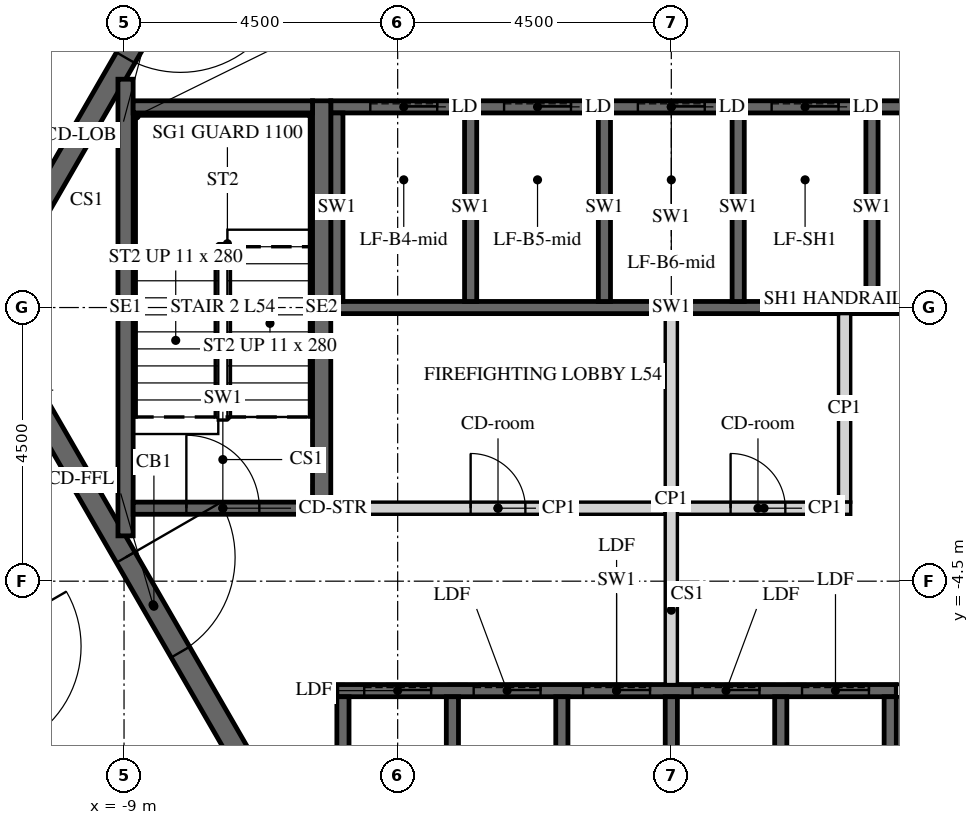
"""IFC4 building model, lengths in metres.
Left out: names, types, materials, properties, quantities, classifications, styles, units other than length and angle.
Written with IfcOpenShell. Run it as: python <this file> out.ifc"""

import sys

from ifc_helpers import new_model, si_unit, direction, frame, frame_2d, origin, place, context, subcontext, project, spatial, polyline, rectangle, outline, extrude, element, fill, save


model = new_model("IFC4")
c1 = context("Model", 3, precision=1e-05, world=origin(), true_north=direction((0.0, 1.0)))
c2 = subcontext(c1, "Body", "Model", "MODEL_VIEW")
j1 = project(units=[si_unit("LENGTHUNIT", "METRE"), si_unit("PLANEANGLEUNIT", "RADIAN")], contexts=[c1])
p1 = place(None, origin())
s1 = spatial("IfcSite", under=j1, at=p1, CompositionType="ELEMENT")
p2 = place(p1, origin())
s2 = spatial("IfcBuilding", under=s1, at=p2, CompositionType="ELEMENT")
p3 = place(p2, frame((0.0, 0.0, 226.8)))
s3 = spatial("IfcBuildingStorey", under=s2, at=p3, CompositionType="ELEMENT", Elevation=226.8)
p4 = place(p3, frame((-7.361, 12.75, -0.15), z_axis=(0.0, 0.0, 1.0), x_axis=(-0.50000571537, -0.866022103989, 0.0)))
e1 = element("IfcWall", 1, at=p4, inside=s3, PredefinedType="SHEAR", context=c2, shape_type="SweptSolid", body=[
    extrude(outline(polyline([(-0.144, -0.25), (14.867, -0.25), (14.578, 0.25), (0.144, 0.25), (-0.144, -0.25)])), origin(), (0.0, 0.0, 1.0), 3.9),
])
p5 = place(p4, frame((6.49, 0.0, 0.15)))
e2 = element("IfcOpeningElement", 2, at=p5, cuts=e1, PredefinedType="OPENING", context=c2, shape_type="SweptSolid", body=[
    extrude(rectangle(XDim=1.8, YDim=2.4, at=frame_2d((0.9, 1.2))), frame((0.0, 0.26, 0.0), z_axis=(0.0, -1.0, 0.0), x_axis=(1.0, 0.0, 0.0)), (0.0, 0.0, 1.0), 0.52),
])
p6 = place(p3, frame((-14.722, 0.0, -0.15), z_axis=(0.0, 0.0, 1.0), x_axis=(0.50000571537, -0.866022103989, 0.0)))
e3 = element("IfcWall", 3, at=p6, inside=s3, PredefinedType="SHEAR", context=c2, shape_type="SweptSolid", body=[
    extrude(outline(polyline([(-0.144, -0.25), (14.867, -0.25), (14.578, 0.25), (0.144, 0.25), (-0.144, -0.25)])), origin(), (0.0, 0.0, 1.0), 3.9),
])
p7 = place(p6, frame((6.432, 0.0, 0.15)))
e4 = element("IfcOpeningElement", 4, at=p7, cuts=e3, PredefinedType="OPENING", context=c2, shape_type="SweptSolid", body=[
    extrude(rectangle(XDim=1.8, YDim=2.4, at=frame_2d((0.9, 1.2))), frame((0.0, 0.26, 0.0), z_axis=(0.0, -1.0, 0.0), x_axis=(1.0, 0.0, 0.0)), (0.0, 0.0, 1.0), 0.52),
])
p8 = place(p3, frame((-5.673, 9.825, -0.15), z_axis=(0.0, 0.0, 1.0), x_axis=(-0.499995046907, -0.866028263435, 0.0)))
e5 = element("IfcWall", 5, at=p8, inside=s3, PredefinedType="SHEAR", context=c2, shape_type="SweptSolid", body=[
    extrude(outline(polyline([(-0.101, -0.175), (11.446, -0.175), (11.244, 0.175), (0.101, 0.175), (-0.101, -0.175)])), origin(), (0.0, 0.0, 1.0), 3.9),
])
p9 = place(p8, frame((4.801, 0.0, 0.15)))
e6 = element("IfcOpeningElement", 6, at=p9, cuts=e5, PredefinedType="OPENING", context=c2, shape_type="SweptSolid", body=[
    extrude(rectangle(XDim=1.8, YDim=2.4, at=frame_2d((0.9, 1.2))), frame((0.0, 0.185, 0.0), z_axis=(0.0, -1.0, 0.0), x_axis=(1.0, 0.0, 0.0)), (0.0, 0.0, 1.0), 0.37),
])
p10 = place(p3, frame((-11.345, 0.0, -0.15), z_axis=(0.0, 0.0, 1.0), x_axis=(0.499995046907, -0.866028263435, 0.0)))
e7 = element("IfcWall", 7, at=p10, inside=s3, PredefinedType="SHEAR", context=c2, shape_type="SweptSolid", body=[
    extrude(outline(polyline([(-0.101, -0.175), (11.446, -0.175), (11.244, 0.175), (0.101, 0.175), (-0.101, -0.175)])), origin(), (0.0, 0.0, 1.0), 3.9),
])
p11 = place(p10, frame((4.744, 0.0, 0.15)))
e8 = element("IfcOpeningElement", 8, at=p11, cuts=e7, PredefinedType="OPENING", context=c2, shape_type="SweptSolid", body=[
    extrude(rectangle(XDim=1.8, YDim=2.4, at=frame_2d((0.9, 1.2))), frame((0.0, 0.185, 0.0), z_axis=(0.0, -1.0, 0.0), x_axis=(1.0, 0.0, 0.0)), (0.0, 0.0, 1.0), 0.37),
])
p12 = place(p3, frame((-5.6, 3.3, -0.25), z_axis=(0.0, 0.0, 1.0), x_axis=(1.0, 0.0, 0.0)))
e9 = element("IfcWall", 9, at=p12, inside=s3, PredefinedType="SHEAR", context=c2, shape_type="SweptSolid", body=[
    extrude(rectangle(XDim=11.2, YDim=0.2, at=frame_2d((5.6, 0.0))), origin(), (0.0, 0.0, 1.0), 3.9),
])
p13 = place(p12, frame((0.65, 0.0, 0.25)))
e10 = element("IfcOpeningElement", 10, at=p13, cuts=e9, PredefinedType="OPENING", context=c2, shape_type="SweptSolid", body=[
    extrude(rectangle(XDim=1.1, YDim=2.1, at=frame_2d((0.55, 1.05))), frame((0.0, 0.11, 0.0), z_axis=(0.0, -1.0, 0.0), x_axis=(1.0, 0.0, 0.0)), (0.0, 0.0, 1.0), 0.22),
])
p14 = place(p12, frame((2.85, 0.0, 0.25)))
e11 = element("IfcOpeningElement", 11, at=p14, cuts=e9, PredefinedType="OPENING", context=c2, shape_type="SweptSolid", body=[
    extrude(rectangle(XDim=1.1, YDim=2.1, at=frame_2d((0.55, 1.05))), frame((0.0, 0.11, 0.0), z_axis=(0.0, -1.0, 0.0), x_axis=(1.0, 0.0, 0.0)), (0.0, 0.0, 1.0), 0.22),
])
p15 = place(p12, frame((5.05, 0.0, 0.25)))
e12 = element("IfcOpeningElement", 12, at=p15, cuts=e9, PredefinedType="OPENING", context=c2, shape_type="SweptSolid", body=[
    extrude(rectangle(XDim=1.1, YDim=2.1, at=frame_2d((0.55, 1.05))), frame((0.0, 0.11, 0.0), z_axis=(0.0, -1.0, 0.0), x_axis=(1.0, 0.0, 0.0)), (0.0, 0.0, 1.0), 0.22),
])
p16 = place(p12, frame((7.25, 0.0, 0.25)))
e13 = element("IfcOpeningElement", 13, at=p16, cuts=e9, PredefinedType="OPENING", context=c2, shape_type="SweptSolid", body=[
    extrude(rectangle(XDim=1.1, YDim=2.1, at=frame_2d((0.55, 1.05))), frame((0.0, 0.11, 0.0), z_axis=(0.0, -1.0, 0.0), x_axis=(1.0, 0.0, 0.0)), (0.0, 0.0, 1.0), 0.22),
])
p17 = place(p12, frame((9.45, 0.0, 0.25)))
e14 = element("IfcOpeningElement", 14, at=p17, cuts=e9, PredefinedType="OPENING", context=c2, shape_type="SweptSolid", body=[
    extrude(rectangle(XDim=1.1, YDim=2.1, at=frame_2d((0.55, 1.05))), frame((0.0, 0.11, 0.0), z_axis=(0.0, -1.0, 0.0), x_axis=(1.0, 0.0, 0.0)), (0.0, 0.0, 1.0), 0.22),
])
p18 = place(p3, frame((-5.6, 0.0, -0.25), z_axis=(0.0, 0.0, 1.0), x_axis=(1.0, 0.0, 0.0)))
e15 = element("IfcWall", 15, at=p18, inside=s3, PredefinedType="SHEAR", context=c2, shape_type="SweptSolid", body=[
    extrude(rectangle(XDim=11.2, YDim=0.2, at=frame_2d((5.6, 0.0))), origin(), (0.0, 0.0, 1.0), 3.9),
])
for number, where, z_axis, x_axis in (
    (16, (-5.5, 0.1, -0.25), (0.0, 0.0, 1.0), (0.0, 1.0, 0.0)),
    (17, (-3.3, 0.1, -0.25), (0.0, 0.0, 1.0), (0.0, 1.0, 0.0)),
    (18, (-1.1, 0.1, -0.25), (0.0, 0.0, 1.0), (0.0, 1.0, 0.0)),
    (19, (1.1, 0.1, -0.25), (0.0, 0.0, 1.0), (0.0, 1.0, 0.0)),
    (20, (3.3, 0.1, -0.25), (0.0, 0.0, 1.0), (0.0, 1.0, 0.0)),
):
    element("IfcWall", number, at=place(p3, frame(where, z_axis=z_axis, x_axis=x_axis)), inside=s3, PredefinedType="SHEAR", context=c2, shape_type="SweptSolid", body=[
        extrude(rectangle(XDim=3.1, YDim=0.2, at=frame_2d((1.55, 0.0))), origin(), (0.0, 0.0, 1.0), 3.9),
    ])
p19 = place(p3, frame((-5.5, -6.3, -0.25), z_axis=(0.0, 0.0, 1.0), x_axis=(1.0, 0.0, 0.0)))
e21 = element("IfcWall", 21, at=p19, inside=s3, PredefinedType="SHEAR", context=c2, shape_type="SweptSolid", body=[
    extrude(rectangle(XDim=9.2, YDim=0.2, at=frame_2d((4.6, 0.0))), origin(), (0.0, 0.0, 1.0), 3.9),
])
p20 = place(p19, frame((0.45, 0.0, 0.25)))
e22 = element("IfcOpeningElement", 22, at=p20, cuts=e21, PredefinedType="OPENING", context=c2, shape_type="SweptSolid", body=[
    extrude(rectangle(XDim=1.1, YDim=2.1, at=frame_2d((0.55, 1.05))), frame((0.0, 0.11, 0.0), z_axis=(0.0, -1.0, 0.0), x_axis=(1.0, 0.0, 0.0)), (0.0, 0.0, 1.0), 0.22),
])
p21 = place(p19, frame((2.25, 0.0, 0.25)))
e23 = element("IfcOpeningElement", 23, at=p21, cuts=e21, PredefinedType="OPENING", context=c2, shape_type="SweptSolid", body=[
    extrude(rectangle(XDim=1.1, YDim=2.1, at=frame_2d((0.55, 1.05))), frame((0.0, 0.11, 0.0), z_axis=(0.0, -1.0, 0.0), x_axis=(1.0, 0.0, 0.0)), (0.0, 0.0, 1.0), 0.22),
])
p22 = place(p19, frame((4.05, 0.0, 0.25)))
e24 = element("IfcOpeningElement", 24, at=p22, cuts=e21, PredefinedType="OPENING", context=c2, shape_type="SweptSolid", body=[
    extrude(rectangle(XDim=1.1, YDim=2.1, at=frame_2d((0.55, 1.05))), frame((0.0, 0.11, 0.0), z_axis=(0.0, -1.0, 0.0), x_axis=(1.0, 0.0, 0.0)), (0.0, 0.0, 1.0), 0.22),
])
p23 = place(p19, frame((5.85, 0.0, 0.25)))
e25 = element("IfcOpeningElement", 25, at=p23, cuts=e21, PredefinedType="OPENING", context=c2, shape_type="SweptSolid", body=[
    extrude(rectangle(XDim=1.1, YDim=2.1, at=frame_2d((0.55, 1.05))), frame((0.0, 0.11, 0.0), z_axis=(0.0, -1.0, 0.0), x_axis=(1.0, 0.0, 0.0)), (0.0, 0.0, 1.0), 0.22),
])
p24 = place(p19, frame((7.65, 0.0, 0.25)))
e26 = element("IfcOpeningElement", 26, at=p24, cuts=e21, PredefinedType="OPENING", context=c2, shape_type="SweptSolid", body=[
    extrude(rectangle(XDim=1.1, YDim=2.1, at=frame_2d((0.55, 1.05))), frame((0.0, 0.11, 0.0), z_axis=(0.0, -1.0, 0.0), x_axis=(1.0, 0.0, 0.0)), (0.0, 0.0, 1.0), 0.22),
])
for number, where, z_axis, x_axis in (
    (27, (-5.4, -9.3, -0.25), (0.0, 0.0, 1.0), (0.0, 1.0, 0.0)),
    (28, (-3.6, -9.3, -0.25), (0.0, 0.0, 1.0), (0.0, 1.0, 0.0)),
    (29, (-1.8, -9.3, -0.25), (0.0, 0.0, 1.0), (0.0, 1.0, 0.0)),
    (30, (0.0, -9.3, -0.25), (0.0, 0.0, 1.0), (0.0, 1.0, 0.0)),
    (31, (1.8, -9.3, -0.25), (0.0, 0.0, 1.0), (0.0, 1.0, 0.0)),
    (32, (3.6, -9.3, -0.25), (0.0, 0.0, 1.0), (0.0, 1.0, 0.0)),
):
    element("IfcWall", number, at=place(p3, frame(where, z_axis=z_axis, x_axis=x_axis)), inside=s3, PredefinedType="SHEAR", context=c2, shape_type="SweptSolid", body=[
        extrude(rectangle(XDim=2.9, YDim=0.2, at=frame_2d((1.45, 0.0))), origin(), (0.0, 0.0, 1.0), 3.9),
    ])
p25 = place(p3, frame((-5.6, -3.3, 0.0), z_axis=(0.0, 0.0, 1.0), x_axis=(1.0, 0.0, 0.0)))
e33 = element("IfcWall", 33, at=p25, inside=s3, PredefinedType="PARTITIONING", context=c2, shape_type="SweptSolid", body=[
    extrude(rectangle(XDim=5.5, YDim=0.2, at=frame_2d((2.75, 0.0))), origin(), (0.0, 0.0, 1.0), 3.65),
])
p26 = place(p25, frame((2.3, 0.0, 0.0)))
e34 = element("IfcOpeningElement", 34, at=p26, cuts=e33, PredefinedType="OPENING", context=c2, shape_type="SweptSolid", body=[
    extrude(rectangle(XDim=0.9, YDim=2.1, at=frame_2d((0.45, 1.05))), frame((0.0, 0.11, 0.0), z_axis=(0.0, -1.0, 0.0), x_axis=(1.0, 0.0, 0.0)), (0.0, 0.0, 1.0), 0.22),
])
p27 = place(p3, frame((0.1, -3.3, 0.0), z_axis=(0.0, 0.0, 1.0), x_axis=(1.0, 0.0, 0.0)))
e35 = element("IfcWall", 35, at=p27, inside=s3, PredefinedType="PARTITIONING", context=c2, shape_type="SweptSolid", body=[
    extrude(rectangle(XDim=2.85, YDim=0.2, at=frame_2d((1.425, 0.0))), origin(), (0.0, 0.0, 1.0), 3.65),
])
p28 = place(p27, frame((0.875, 0.0, 0.0)))
e36 = element("IfcOpeningElement", 36, at=p28, cuts=e35, PredefinedType="OPENING", context=c2, shape_type="SweptSolid", body=[
    extrude(rectangle(XDim=0.9, YDim=2.1, at=frame_2d((0.45, 1.05))), frame((0.0, 0.11, 0.0), z_axis=(0.0, -1.0, 0.0), x_axis=(1.0, 0.0, 0.0)), (0.0, 0.0, 1.0), 0.22),
])
p29 = place(p3, frame((2.85, -3.2, 0.0), z_axis=(0.0, 0.0, 1.0), x_axis=(0.0, 1.0, 0.0)))
e37 = element("IfcWall", 37, at=p29, inside=s3, PredefinedType="PARTITIONING", context=c2, shape_type="SweptSolid", body=[
    extrude(rectangle(XDim=3.1, YDim=0.2, at=frame_2d((1.55, 0.0))), origin(), (0.0, 0.0, 1.0), 3.65),
])
p30 = place(p3, frame((0.0, -6.2, 0.0), z_axis=(0.0, 0.0, 1.0), x_axis=(0.0, 1.0, 0.0)))
e38 = element("IfcWall", 38, at=p30, inside=s3, PredefinedType="PARTITIONING", context=c2, shape_type="SweptSolid", body=[
    extrude(rectangle(XDim=6.1, YDim=0.2, at=frame_2d((3.05, 0.0))), origin(), (0.0, 0.0, 1.0), 3.65),
])
p31 = place(p3, frame((3.7, -6.3, 0.0), z_axis=(0.0, 0.0, 1.0), x_axis=(1.0, 0.0, 0.0)))
e39 = element("IfcWall", 39, at=p31, inside=s3, PredefinedType="PARTITIONING", context=c2, shape_type="SweptSolid", body=[
    extrude(rectangle(XDim=3.806, YDim=0.2, at=frame_2d((1.903, 0.0))), origin(), (0.0, 0.0, 1.0), 3.65),
])
p32 = place(p31, frame((1.453, 0.0, 0.0)))
e40 = element("IfcOpeningElement", 40, at=p32, cuts=e39, PredefinedType="OPENING", context=c2, shape_type="SweptSolid", body=[
    extrude(rectangle(XDim=0.9, YDim=2.1, at=frame_2d((0.45, 1.05))), frame((0.0, 0.11, 0.0), z_axis=(0.0, -1.0, 0.0), x_axis=(1.0, 0.0, 0.0)), (0.0, 0.0, 1.0), 0.22),
])
p33 = place(p3, frame((-5.75, -3.4, -0.25), z_axis=(0.0, 0.0, 1.0), x_axis=(0.0, 1.0, 0.0)))
e41 = element("IfcWall", 41, at=p33, inside=s3, PredefinedType="SHEAR", context=c2, shape_type="SweptSolid", body=[
    extrude(rectangle(XDim=6.8, YDim=0.3, at=frame_2d((3.4, 0.0))), origin(), (0.0, 0.0, 1.0), 3.9),
])
p34 = place(p3, frame((-8.975, -3.755, -0.25), z_axis=(0.0, 0.0, 1.0), x_axis=(0.0, 1.0, 0.0)))
e42 = element("IfcWall", 42, at=p34, inside=s3, PredefinedType="SHEAR", context=c2, shape_type="SweptSolid", body=[
    extrude(rectangle(XDim=7.51, YDim=0.25, at=frame_2d((3.755, 0.0))), origin(), (0.0, 0.0, 1.0), 3.9),
])
p35 = place(p3, frame((-8.85, 3.3, -0.25), z_axis=(0.0, 0.0, 1.0), x_axis=(1.0, 0.0, 0.0)))
e43 = element("IfcWall", 43, at=p35, inside=s3, PredefinedType="SHEAR", context=c2, shape_type="SweptSolid", body=[
    extrude(rectangle(XDim=2.95, YDim=0.2, at=frame_2d((1.475, 0.0))), origin(), (0.0, 0.0, 1.0), 3.9),
])
p36 = place(p3, frame((-8.85, -3.3, -0.25), z_axis=(0.0, 0.0, 1.0), x_axis=(1.0, 0.0, 0.0)))
e44 = element("IfcWall", 44, at=p36, inside=s3, PredefinedType="SHEAR", context=c2, shape_type="SweptSolid", body=[
    extrude(rectangle(XDim=2.95, YDim=0.2, at=frame_2d((1.475, 0.0))), origin(), (0.0, 0.0, 1.0), 3.9),
])
p37 = place(p36, frame((0.875, 0.0, 0.25)))
e45 = element("IfcOpeningElement", 45, at=p37, cuts=e44, PredefinedType="OPENING", context=c2, shape_type="SweptSolid", body=[
    extrude(rectangle(XDim=1.2, YDim=2.4, at=frame_2d((0.6, 1.2))), frame((0.0, 0.11, 0.0), z_axis=(0.0, -1.0, 0.0), x_axis=(1.0, 0.0, 0.0)), (0.0, 0.0, 1.0), 0.22),
])
p38 = place(p3, frame((-8.588, 14.725, 0.0), z_axis=(0.0, 0.0, 1.0), x_axis=(-0.499999926766, -0.866025446066, 0.0)))
e46 = element("IfcWall", 46, at=p38, inside=s3, PredefinedType="PARTITIONING", context=c2, shape_type="SweptSolid", body=[
    extrude(rectangle(XDim=13.786, YDim=0.15, at=frame_2d((6.893, 0.0))), origin(), (0.0, 0.0, 1.0), 2.988),
])
p39 = place(p38, frame((4.276, 0.0, 0.0)))
e47 = element("IfcOpeningElement", 47, at=p39, cuts=e46, PredefinedType="OPENING", context=c2, shape_type="SweptSolid", body=[
    extrude(rectangle(XDim=1.0, YDim=2.1, at=frame_2d((0.5, 1.05))), frame((0.0, 0.085, 0.0), z_axis=(0.0, -1.0, 0.0), x_axis=(1.0, 0.0, 0.0)), (0.0, 0.0, 1.0), 0.17),
])
p40 = place(p38, frame((11.073, 0.0, 0.0)))
e48 = element("IfcOpeningElement", 48, at=p40, cuts=e46, PredefinedType="OPENING", context=c2, shape_type="SweptSolid", body=[
    extrude(rectangle(XDim=1.0, YDim=2.1, at=frame_2d((0.5, 1.05))), frame((0.0, 0.085, 0.0), z_axis=(0.0, -1.0, 0.0), x_axis=(1.0, 0.0, 0.0)), (0.0, 0.0, 1.0), 0.17),
])
p41 = place(p3, frame((-15.863, -2.125, 0.0), z_axis=(0.0, 0.0, 1.0), x_axis=(0.500008833422, -0.866020303746, 0.0)))
e49 = element("IfcWall", 49, at=p41, inside=s3, PredefinedType="PARTITIONING", context=c2, shape_type="SweptSolid", body=[
    extrude(rectangle(XDim=14.636, YDim=0.15, at=frame_2d((7.318, 0.0))), origin(), (0.0, 0.0, 1.0), 2.988),
])
p42 = place(p41, frame((0.861, 0.0, 0.0)))
e50 = element("IfcOpeningElement", 50, at=p42, cuts=e49, PredefinedType="OPENING", context=c2, shape_type="SweptSolid", body=[
    extrude(rectangle(XDim=1.0, YDim=2.1, at=frame_2d((0.5, 1.05))), frame((0.0, 0.085, 0.0), z_axis=(0.0, -1.0, 0.0), x_axis=(1.0, 0.0, 0.0)), (0.0, 0.0, 1.0), 0.17),
])
p43 = place(p41, frame((9.909, 0.0, 0.0)))
e51 = element("IfcOpeningElement", 51, at=p43, cuts=e49, PredefinedType="OPENING", context=c2, shape_type="SweptSolid", body=[
    extrude(rectangle(XDim=1.0, YDim=2.1, at=frame_2d((0.5, 1.05))), frame((0.0, 0.085, 0.0), z_axis=(0.0, -1.0, 0.0), x_axis=(1.0, 0.0, 0.0)), (0.0, 0.0, 1.0), 0.17),
])
p44 = place(p9, origin())
e52 = element("IfcDoor", 52, at=p44, inside=s3, OperationType="DOUBLE_DOOR_SINGLE_SWING", PredefinedType="DOOR", context=c2, shape_type="SweptSolid", body=[
    extrude(rectangle(XDim=1.8, YDim=2.4, at=frame_2d((0.9, 1.2))), frame((0.0, 0.025, 0.0), z_axis=(0.0, -1.0, 0.0), x_axis=(1.0, 0.0, 0.0)), (0.0, 0.0, 1.0), 0.05),
])
fill(e6, e52)
p45 = place(p11, origin())
e53 = element("IfcDoor", 53, at=p45, inside=s3, OperationType="DOUBLE_DOOR_SINGLE_SWING", PredefinedType="DOOR", context=c2, shape_type="SweptSolid", body=[
    extrude(rectangle(XDim=1.8, YDim=2.4, at=frame_2d((0.9, 1.2))), frame((0.0, 0.025, 0.0), z_axis=(0.0, -1.0, 0.0), x_axis=(1.0, 0.0, 0.0)), (0.0, 0.0, 1.0), 0.05),
])
fill(e8, e53)
p46 = place(p26, origin())
e54 = element("IfcDoor", 54, at=p46, inside=s3, OperationType="SINGLE_SWING_LEFT", PredefinedType="DOOR", context=c2, shape_type="SweptSolid", body=[
    extrude(rectangle(XDim=0.9, YDim=2.1, at=frame_2d((0.45, 1.05))), frame((0.0, 0.025, 0.0), z_axis=(0.0, -1.0, 0.0), x_axis=(1.0, 0.0, 0.0)), (0.0, 0.0, 1.0), 0.05),
])
fill(e34, e54)
p47 = place(p28, origin())
e55 = element("IfcDoor", 55, at=p47, inside=s3, OperationType="SINGLE_SWING_LEFT", PredefinedType="DOOR", context=c2, shape_type="SweptSolid", body=[
    extrude(rectangle(XDim=0.9, YDim=2.1, at=frame_2d((0.45, 1.05))), frame((0.0, 0.025, 0.0), z_axis=(0.0, -1.0, 0.0), x_axis=(1.0, 0.0, 0.0)), (0.0, 0.0, 1.0), 0.05),
])
fill(e36, e55)
p48 = place(p37, origin())
e56 = element("IfcDoor", 56, at=p48, inside=s3, OperationType="SINGLE_SWING_LEFT", PredefinedType="DOOR", context=c2, shape_type="SweptSolid", body=[
    extrude(rectangle(XDim=1.2, YDim=2.4, at=frame_2d((0.6, 1.2))), frame((0.0, 0.025, 0.0), z_axis=(0.0, -1.0, 0.0), x_axis=(1.0, 0.0, 0.0)), (0.0, 0.0, 1.0), 0.05),
])
fill(e45, e56)
p49 = place(p13, origin())
e57 = element("IfcDoor", 57, at=p49, inside=s3, OperationType="SLIDING_TO_LEFT", PredefinedType="DOOR", context=c2, shape_type="SweptSolid", body=[
    extrude(rectangle(XDim=1.1, YDim=2.1, at=frame_2d((0.55, 1.05))), frame((0.0, 0.025, 0.0), z_axis=(0.0, -1.0, 0.0), x_axis=(1.0, 0.0, 0.0)), (0.0, 0.0, 1.0), 0.05),
])
fill(e10, e57)
p50 = place(p14, origin())
e58 = element("IfcDoor", 58, at=p50, inside=s3, OperationType="SLIDING_TO_LEFT", PredefinedType="DOOR", context=c2, shape_type="SweptSolid", body=[
    extrude(rectangle(XDim=1.1, YDim=2.1, at=frame_2d((0.55, 1.05))), frame((0.0, 0.025, 0.0), z_axis=(0.0, -1.0, 0.0), x_axis=(1.0, 0.0, 0.0)), (0.0, 0.0, 1.0), 0.05),
])
fill(e11, e58)
p51 = place(p15, origin())
e59 = element("IfcDoor", 59, at=p51, inside=s3, OperationType="SLIDING_TO_LEFT", PredefinedType="DOOR", context=c2, shape_type="SweptSolid", body=[
    extrude(rectangle(XDim=1.1, YDim=2.1, at=frame_2d((0.55, 1.05))), frame((0.0, 0.025, 0.0), z_axis=(0.0, -1.0, 0.0), x_axis=(1.0, 0.0, 0.0)), (0.0, 0.0, 1.0), 0.05),
])
fill(e12, e59)
p52 = place(p16, origin())
e60 = element("IfcDoor", 60, at=p52, inside=s3, OperationType="SLIDING_TO_LEFT", PredefinedType="DOOR", context=c2, shape_type="SweptSolid", body=[
    extrude(rectangle(XDim=1.1, YDim=2.1, at=frame_2d((0.55, 1.05))), frame((0.0, 0.025, 0.0), z_axis=(0.0, -1.0, 0.0), x_axis=(1.0, 0.0, 0.0)), (0.0, 0.0, 1.0), 0.05),
])
fill(e13, e60)
p53 = place(p20, origin())
e61 = element("IfcDoor", 61, at=p53, inside=s3, OperationType="SLIDING_TO_LEFT", PredefinedType="DOOR", context=c2, shape_type="SweptSolid", body=[
    extrude(rectangle(XDim=1.1, YDim=2.1, at=frame_2d((0.55, 1.05))), frame((0.0, 0.025, 0.0), z_axis=(0.0, -1.0, 0.0), x_axis=(1.0, 0.0, 0.0)), (0.0, 0.0, 1.0), 0.05),
])
fill(e22, e61)
p54 = place(p21, origin())
e62 = element("IfcDoor", 62, at=p54, inside=s3, OperationType="SLIDING_TO_LEFT", PredefinedType="DOOR", context=c2, shape_type="SweptSolid", body=[
    extrude(rectangle(XDim=1.1, YDim=2.1, at=frame_2d((0.55, 1.05))), frame((0.0, 0.025, 0.0), z_axis=(0.0, -1.0, 0.0), x_axis=(1.0, 0.0, 0.0)), (0.0, 0.0, 1.0), 0.05),
])
fill(e23, e62)
p55 = place(p22, origin())
e63 = element("IfcDoor", 63, at=p55, inside=s3, OperationType="SLIDING_TO_LEFT", PredefinedType="DOOR", context=c2, shape_type="SweptSolid", body=[
    extrude(rectangle(XDim=1.1, YDim=2.1, at=frame_2d((0.55, 1.05))), frame((0.0, 0.025, 0.0), z_axis=(0.0, -1.0, 0.0), x_axis=(1.0, 0.0, 0.0)), (0.0, 0.0, 1.0), 0.05),
])
fill(e24, e63)
p56 = place(p23, origin())
e64 = element("IfcDoor", 64, at=p56, inside=s3, OperationType="SLIDING_TO_LEFT", PredefinedType="DOOR", context=c2, shape_type="SweptSolid", body=[
    extrude(rectangle(XDim=1.1, YDim=2.1, at=frame_2d((0.55, 1.05))), frame((0.0, 0.025, 0.0), z_axis=(0.0, -1.0, 0.0), x_axis=(1.0, 0.0, 0.0)), (0.0, 0.0, 1.0), 0.05),
])
fill(e25, e64)
p57 = place(p24, origin())
e65 = element("IfcDoor", 65, at=p57, inside=s3, OperationType="SLIDING_TO_LEFT", PredefinedType="DOOR", context=c2, shape_type="SweptSolid", body=[
    extrude(rectangle(XDim=1.1, YDim=2.1, at=frame_2d((0.55, 1.05))), frame((0.0, 0.025, 0.0), z_axis=(0.0, -1.0, 0.0), x_axis=(1.0, 0.0, 0.0)), (0.0, 0.0, 1.0), 0.05),
])
fill(e26, e65)
save(model, sys.argv[1])
